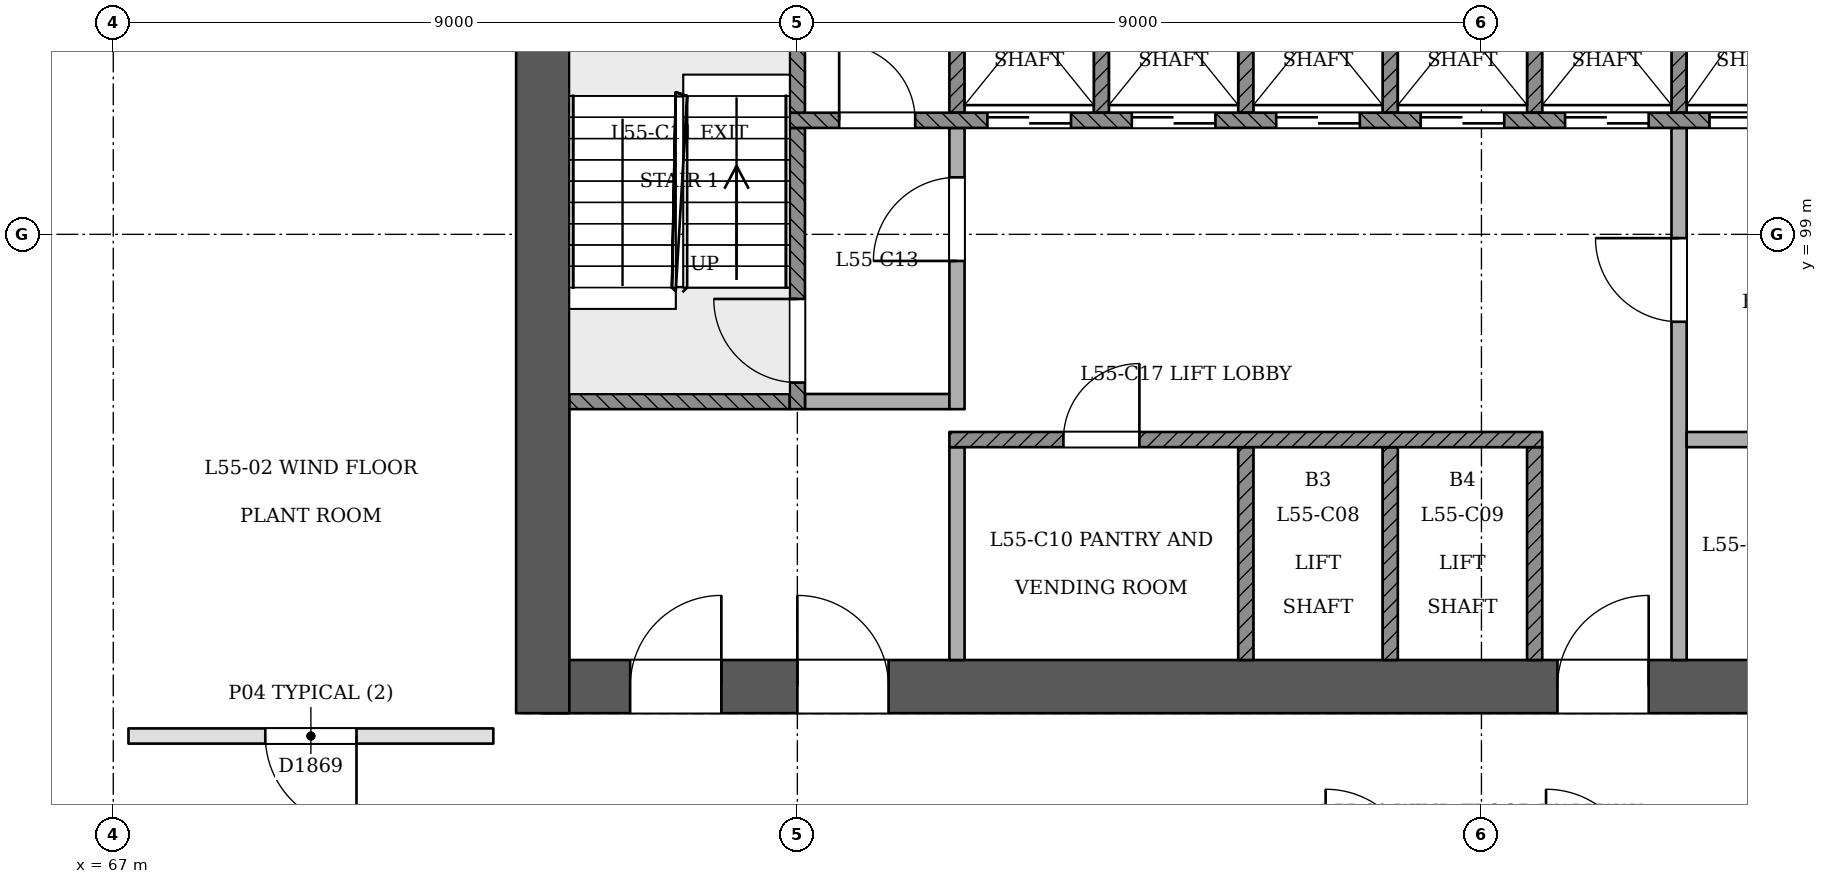
"""IFC4 building model, lengths in metres.
Left out: names, types, materials, properties, quantities, classifications, styles, units other than length and angle.
Written with IfcOpenShell. Run it as: python <this file> out.ifc"""

import sys

from ifc_helpers import new_model, si_unit, direction, frame, frame_2d, origin, place, context, subcontext, project, spatial, rectangle, extrude, element, fill, save


model = new_model("IFC4")
c1 = context("Model", 3, precision=1e-05, world=origin(), true_north=direction((0.0, 1.0)))
c2 = subcontext(c1, "Body", "Model", "MODEL_VIEW")
j1 = project(units=[si_unit("LENGTHUNIT", "METRE"), si_unit("PLANEANGLEUNIT", "RADIAN")], contexts=[c1])
p1 = place(None, origin())
s1 = spatial("IfcSite", under=j1, at=p1, CompositionType="ELEMENT")
p2 = place(p1, origin())
s2 = spatial("IfcBuilding", under=s1, at=p2, CompositionType="ELEMENT")
p3 = place(p2, frame((0.0, 0.0, 212.4)))
s3 = spatial("IfcBuildingStorey", under=s2, at=p3, CompositionType="ELEMENT", Elevation=212.4)
p4 = place(p3, frame((72.65, 93.05, 0.0), z_axis=(0.0, 0.0, 1.0), x_axis=(1.0, 0.0, 0.0)))
e1 = element("IfcWall", 1, at=p4, inside=s3, PredefinedType="SHEAR", context=c2, shape_type="SweptSolid", body=[
    extrude(rectangle(XDim=25.05, YDim=0.7, at=frame_2d((12.525, 0.0))), origin(), (0.0, 0.0, 1.0), 7.0),
])
p5 = place(p4, frame((1.15, 0.0, 0.0)))
e2 = element("IfcOpeningElement", 2, at=p5, cuts=e1, PredefinedType="OPENING", context=c2, shape_type="SweptSolid", body=[
    extrude(rectangle(XDim=1.2, YDim=2.1, at=frame_2d((0.6, 1.05))), frame((0.0, 0.36, 0.0), z_axis=(0.0, -1.0, 0.0), x_axis=(1.0, 0.0, 0.0)), (0.0, 0.0, 1.0), 0.721),
])
p6 = place(p4, frame((3.35, 0.0, 0.0)))
e3 = element("IfcOpeningElement", 3, at=p6, cuts=e1, PredefinedType="OPENING", context=c2, shape_type="SweptSolid", body=[
    extrude(rectangle(XDim=1.2, YDim=2.1, at=frame_2d((0.6, 1.05))), frame((0.0, 0.36, 0.0), z_axis=(0.0, -1.0, 0.0), x_axis=(1.0, 0.0, 0.0)), (0.0, 0.0, 1.0), 0.721),
])
p7 = place(p4, frame((13.35, 0.0, 0.0)))
e4 = element("IfcOpeningElement", 4, at=p7, cuts=e1, PredefinedType="OPENING", context=c2, shape_type="SweptSolid", body=[
    extrude(rectangle(XDim=1.2, YDim=2.1, at=frame_2d((0.6, 1.05))), frame((0.0, 0.36, 0.0), z_axis=(0.0, -1.0, 0.0), x_axis=(1.0, 0.0, 0.0)), (0.0, 0.0, 1.0), 0.721),
])
p8 = place(p4, frame((16.212, 0.0, 0.0)))
e5 = element("IfcOpeningElement", 5, at=p8, cuts=e1, PredefinedType="OPENING", context=c2, shape_type="SweptSolid", body=[
    extrude(rectangle(XDim=1.0, YDim=2.1, at=frame_2d((0.5, 1.05))), frame((0.0, 0.36, 0.0), z_axis=(0.0, -1.0, 0.0), x_axis=(1.0, 0.0, 0.0)), (0.0, 0.0, 1.0), 0.721),
])
p9 = place(p4, frame((19.65, 0.0, 0.0)))
e6 = element("IfcOpeningElement", 6, at=p9, cuts=e1, PredefinedType="OPENING", context=c2, shape_type="SweptSolid", body=[
    extrude(rectangle(XDim=1.0, YDim=2.1, at=frame_2d((0.5, 1.05))), frame((0.0, 0.36, 0.0), z_axis=(0.0, -1.0, 0.0), x_axis=(1.0, 0.0, 0.0)), (0.0, 0.0, 1.0), 0.721),
])
p10 = place(p4, frame((22.637, 0.0, 0.0)))
e7 = element("IfcOpeningElement", 7, at=p10, cuts=e1, PredefinedType="OPENING", context=c2, shape_type="SweptSolid", body=[
    extrude(rectangle(XDim=1.0, YDim=2.1, at=frame_2d((0.5, 1.05))), frame((0.0, 0.36, 0.0), z_axis=(0.0, -1.0, 0.0), x_axis=(1.0, 0.0, 0.0)), (0.0, 0.0, 1.0), 0.721),
])
p11 = place(p3, frame((72.65, 103.75, 0.0), z_axis=(0.0, 0.0, 1.0), x_axis=(0.0, -1.0, 0.0)))
e8 = element("IfcWall", 8, at=p11, inside=s3, PredefinedType="SHEAR", context=c2, shape_type="SweptSolid", body=[
    extrude(rectangle(XDim=11.05, YDim=0.7, at=frame_2d((5.525, 0.0))), origin(), (0.0, 0.0, 1.0), 7.0),
])
p12 = place(p3, frame((72.0, 92.4, 0.0), z_axis=(0.0, 0.0, 1.0), x_axis=(-1.0, 0.0, 0.0)))
e9 = element("IfcWall", 9, at=p12, inside=s3, PredefinedType="PARTITIONING", context=c2, shape_type="SweptSolid", body=[
    extrude(rectangle(XDim=4.8, YDim=0.2, at=frame_2d((2.4, 0.0))), origin(), (0.0, 0.0, 1.0), 6.6),
])
p13 = place(p12, frame((1.8, 0.0, 0.0)))
e10 = element("IfcOpeningElement", 10, at=p13, cuts=e9, PredefinedType="OPENING", context=c2, shape_type="SweptSolid", body=[
    extrude(rectangle(XDim=1.2, YDim=2.4, at=frame_2d((0.6, 1.2))), frame((0.0, 0.11, 0.0), z_axis=(0.0, -1.0, 0.0), x_axis=(1.0, 0.0, 0.0)), (0.0, 0.0, 1.0), 0.221),
])
p14 = place(p3, frame((78.1, 93.4, 0.0), z_axis=(0.0, 0.0, 1.0), x_axis=(0.0, 1.0, 0.0)))
e11 = element("IfcWall", 11, at=p14, inside=s3, PredefinedType="PARTITIONING", context=c2, shape_type="SweptSolid", body=[
    extrude(rectangle(XDim=2.8, YDim=0.2, at=frame_2d((1.4, 0.0))), origin(), (0.0, 0.0, 1.0), 6.6),
])
for number, where, z_axis, x_axis in (
    (12, (81.9, 93.4, 0.0), (0.0, 0.0, 1.0), (0.0, 1.0, 0.0)),
    (13, (83.8, 93.4, 0.0), (0.0, 0.0, 1.0), (0.0, 1.0, 0.0)),
    (14, (85.7, 93.4, 0.0), (0.0, 0.0, 1.0), (0.0, 1.0, 0.0)),
):
    element("IfcWall", number, at=place(p3, frame(where, z_axis=z_axis, x_axis=x_axis)), inside=s3, PredefinedType="SOLIDWALL", context=c2, shape_type="SweptSolid", body=[
        extrude(rectangle(XDim=2.8, YDim=0.2, at=frame_2d((1.4, 0.0))), origin(), (0.0, 0.0, 1.0), 6.6),
    ])
p15 = place(p3, frame((87.6, 93.4, 0.0), z_axis=(0.0, 0.0, 1.0), x_axis=(0.0, 1.0, 0.0)))
e15 = element("IfcWall", 15, at=p15, inside=s3, PredefinedType="PARTITIONING", context=c2, shape_type="SweptSolid", body=[
    extrude(rectangle(XDim=7.0, YDim=0.2, at=frame_2d((3.5, 0.0))), origin(), (0.0, 0.0, 1.0), 6.6),
])
p16 = place(p15, frame((4.45, 0.0, 0.0)))
e16 = element("IfcOpeningElement", 16, at=p16, cuts=e15, PredefinedType="OPENING", context=c2, shape_type="SweptSolid", body=[
    extrude(rectangle(XDim=1.1, YDim=2.1, at=frame_2d((0.55, 1.05))), frame((0.0, 0.11, 0.0), z_axis=(0.0, -1.0, 0.0), x_axis=(1.0, 0.0, 0.0)), (0.0, 0.0, 1.0), 0.221),
])
p17 = place(p3, frame((78.0, 96.3, 0.0), z_axis=(0.0, 0.0, 1.0), x_axis=(1.0, 0.0, 0.0)))
e17 = element("IfcWall", 17, at=p17, inside=s3, PredefinedType="SOLIDWALL", context=c2, shape_type="SweptSolid", body=[
    extrude(rectangle(XDim=7.8, YDim=0.2, at=frame_2d((3.9, 0.0))), origin(), (0.0, 0.0, 1.0), 6.6),
])
p18 = place(p17, frame((1.5, 0.0, 0.0)))
e18 = element("IfcOpeningElement", 18, at=p18, cuts=e17, PredefinedType="OPENING", context=c2, shape_type="SweptSolid", body=[
    extrude(rectangle(XDim=1.0, YDim=2.1, at=frame_2d((0.5, 1.05))), frame((0.0, 0.11, 0.0), z_axis=(0.0, -1.0, 0.0), x_axis=(1.0, 0.0, 0.0)), (0.0, 0.0, 1.0), 0.221),
])
p19 = place(p3, frame((87.7, 96.3, 0.0), z_axis=(0.0, 0.0, 1.0), x_axis=(1.0, 0.0, 0.0)))
e19 = element("IfcWall", 19, at=p19, inside=s3, PredefinedType="PARTITIONING", context=c2, shape_type="SweptSolid", body=[
    extrude(rectangle(XDim=3.6, YDim=0.2, at=frame_2d((1.8, 0.0))), origin(), (0.0, 0.0, 1.0), 6.6),
])
p20 = place(p3, frame((73.0, 96.8, 0.0), z_axis=(0.0, 0.0, 1.0), x_axis=(1.0, 0.0, 0.0)))
e20 = element("IfcWall", 20, at=p20, inside=s3, PredefinedType="SOLIDWALL", context=c2, shape_type="SweptSolid", body=[
    extrude(rectangle(XDim=2.9, YDim=0.2, at=frame_2d((1.45, 0.0))), origin(), (0.0, 0.0, 1.0), 6.6),
])
p21 = place(p3, frame((76.0, 96.7, 0.0), z_axis=(0.0, 0.0, 1.0), x_axis=(0.0, 1.0, 0.0)))
e21 = element("IfcWall", 21, at=p21, inside=s3, PredefinedType="SOLIDWALL", context=c2, shape_type="SweptSolid", body=[
    extrude(rectangle(XDim=3.7, YDim=0.2, at=frame_2d((1.85, 0.0))), origin(), (0.0, 0.0, 1.0), 6.6),
])
p22 = place(p21, frame((0.35, 0.0, 0.0)))
e22 = element("IfcOpeningElement", 22, at=p22, cuts=e21, PredefinedType="OPENING", context=c2, shape_type="SweptSolid", body=[
    extrude(rectangle(XDim=1.1, YDim=2.1, at=frame_2d((0.55, 1.05))), frame((0.0, 0.11, 0.0), z_axis=(0.0, -1.0, 0.0), x_axis=(1.0, 0.0, 0.0)), (0.0, 0.0, 1.0), 0.221),
])
p23 = place(p3, frame((76.1, 96.8, 0.0), z_axis=(0.0, 0.0, 1.0), x_axis=(1.0, 0.0, 0.0)))
e23 = element("IfcWall", 23, at=p23, inside=s3, PredefinedType="PARTITIONING", context=c2, shape_type="SweptSolid", body=[
    extrude(rectangle(XDim=1.9, YDim=0.2, at=frame_2d((0.95, 0.0))), origin(), (0.0, 0.0, 1.0), 6.6),
])
p24 = place(p3, frame((78.1, 96.7, 0.0), z_axis=(0.0, 0.0, 1.0), x_axis=(0.0, 1.0, 0.0)))
e24 = element("IfcWall", 24, at=p24, inside=s3, PredefinedType="PARTITIONING", context=c2, shape_type="SweptSolid", body=[
    extrude(rectangle(XDim=3.7, YDim=0.2, at=frame_2d((1.85, 0.0))), origin(), (0.0, 0.0, 1.0), 6.6),
])
p25 = place(p24, frame((1.95, 0.0, 0.0)))
e25 = element("IfcOpeningElement", 25, at=p25, cuts=e24, PredefinedType="OPENING", context=c2, shape_type="SweptSolid", body=[
    extrude(rectangle(XDim=1.1, YDim=2.1, at=frame_2d((0.55, 1.05))), frame((0.0, 0.11, 0.0), z_axis=(0.0, -1.0, 0.0), x_axis=(1.0, 0.0, 0.0)), (0.0, 0.0, 1.0), 0.221),
])
p26 = place(p3, frame((75.9, 100.5, 0.0), z_axis=(0.0, 0.0, 1.0), x_axis=(1.0, 0.0, 0.0)))
e26 = element("IfcWall", 26, at=p26, inside=s3, PredefinedType="SOLIDWALL", context=c2, shape_type="SweptSolid", body=[
    extrude(rectangle(XDim=18.2, YDim=0.2, at=frame_2d((9.1, 0.0))), origin(), (0.0, 0.0, 1.0), 6.6),
])
p27 = place(p26, frame((2.6, 0.0, 0.0)))
e27 = element("IfcOpeningElement", 27, at=p27, cuts=e26, PredefinedType="OPENING", context=c2, shape_type="SweptSolid", body=[
    extrude(rectangle(XDim=1.1, YDim=2.1, at=frame_2d((0.55, 1.05))), frame((0.0, 0.11, 0.0), z_axis=(0.0, -1.0, 0.0), x_axis=(1.0, 0.0, 0.0)), (0.0, 0.0, 1.0), 0.221),
])
p28 = place(p26, frame((4.5, 0.0, 0.0)))
e28 = element("IfcOpeningElement", 28, at=p28, cuts=e26, PredefinedType="OPENING", context=c2, shape_type="SweptSolid", body=[
    extrude(rectangle(XDim=1.1, YDim=2.1, at=frame_2d((0.55, 1.05))), frame((0.0, 0.11, 0.0), z_axis=(0.0, -1.0, 0.0), x_axis=(1.0, 0.0, 0.0)), (0.0, 0.0, 1.0), 0.221),
])
p29 = place(p26, frame((6.4, 0.0, 0.0)))
e29 = element("IfcOpeningElement", 29, at=p29, cuts=e26, PredefinedType="OPENING", context=c2, shape_type="SweptSolid", body=[
    extrude(rectangle(XDim=1.1, YDim=2.1, at=frame_2d((0.55, 1.05))), frame((0.0, 0.11, 0.0), z_axis=(0.0, -1.0, 0.0), x_axis=(1.0, 0.0, 0.0)), (0.0, 0.0, 1.0), 0.221),
])
p30 = place(p26, frame((8.3, 0.0, 0.0)))
e30 = element("IfcOpeningElement", 30, at=p30, cuts=e26, PredefinedType="OPENING", context=c2, shape_type="SweptSolid", body=[
    extrude(rectangle(XDim=1.1, YDim=2.1, at=frame_2d((0.55, 1.05))), frame((0.0, 0.11, 0.0), z_axis=(0.0, -1.0, 0.0), x_axis=(1.0, 0.0, 0.0)), (0.0, 0.0, 1.0), 0.221),
])
p31 = place(p26, frame((10.2, 0.0, 0.0)))
e31 = element("IfcOpeningElement", 31, at=p31, cuts=e26, PredefinedType="OPENING", context=c2, shape_type="SweptSolid", body=[
    extrude(rectangle(XDim=1.1, YDim=2.1, at=frame_2d((0.55, 1.05))), frame((0.0, 0.11, 0.0), z_axis=(0.0, -1.0, 0.0), x_axis=(1.0, 0.0, 0.0)), (0.0, 0.0, 1.0), 0.221),
])
p32 = place(p26, frame((12.1, 0.0, 0.0)))
e32 = element("IfcOpeningElement", 32, at=p32, cuts=e26, PredefinedType="OPENING", context=c2, shape_type="SweptSolid", body=[
    extrude(rectangle(XDim=1.1, YDim=2.1, at=frame_2d((0.55, 1.05))), frame((0.0, 0.11, 0.0), z_axis=(0.0, -1.0, 0.0), x_axis=(1.0, 0.0, 0.0)), (0.0, 0.0, 1.0), 0.221),
])
p33 = place(p26, frame((14.0, 0.0, 0.0)))
e33 = element("IfcOpeningElement", 33, at=p33, cuts=e26, PredefinedType="OPENING", context=c2, shape_type="SweptSolid", body=[
    extrude(rectangle(XDim=1.1, YDim=2.1, at=frame_2d((0.55, 1.05))), frame((0.0, 0.11, 0.0), z_axis=(0.0, -1.0, 0.0), x_axis=(1.0, 0.0, 0.0)), (0.0, 0.0, 1.0), 0.221),
])
p34 = place(p26, frame((0.65, 0.0, 0.0)))
e34 = element("IfcOpeningElement", 34, at=p34, cuts=e26, PredefinedType="OPENING", context=c2, shape_type="SweptSolid", body=[
    extrude(rectangle(XDim=1.0, YDim=2.1, at=frame_2d((0.5, 1.05))), frame((0.0, 0.11, 0.0), z_axis=(0.0, -1.0, 0.0), x_axis=(1.0, 0.0, 0.0)), (0.0, 0.0, 1.0), 0.221),
])
p35 = place(p26, frame((16.3, 0.0, 0.0)))
e35 = element("IfcOpeningElement", 35, at=p35, cuts=e26, PredefinedType="OPENING", context=c2, shape_type="SweptSolid", body=[
    extrude(rectangle(XDim=1.0, YDim=2.1, at=frame_2d((0.5, 1.05))), frame((0.0, 0.11, 0.0), z_axis=(0.0, -1.0, 0.0), x_axis=(1.0, 0.0, 0.0)), (0.0, 0.0, 1.0), 0.221),
])
for number, where, z_axis, x_axis in (
    (36, (76.0, 100.6, 0.0), (0.0, 0.0, 1.0), (0.0, 1.0, 0.0)),
    (37, (78.1, 100.6, 0.0), (0.0, 0.0, 1.0), (0.0, 1.0, 0.0)),
    (38, (80.0, 100.6, 0.0), (0.0, 0.0, 1.0), (0.0, 1.0, 0.0)),
    (39, (81.9, 100.6, 0.0), (0.0, 0.0, 1.0), (0.0, 1.0, 0.0)),
    (40, (83.8, 100.6, 0.0), (0.0, 0.0, 1.0), (0.0, 1.0, 0.0)),
    (41, (85.7, 100.6, 0.0), (0.0, 0.0, 1.0), (0.0, 1.0, 0.0)),
    (42, (87.6, 100.6, 0.0), (0.0, 0.0, 1.0), (0.0, 1.0, 0.0)),
):
    element("IfcWall", number, at=place(p3, frame(where, z_axis=z_axis, x_axis=x_axis)), inside=s3, PredefinedType="SOLIDWALL", context=c2, shape_type="SweptSolid", body=[
        extrude(rectangle(XDim=2.8, YDim=0.2, at=frame_2d((1.4, 0.0))), origin(), (0.0, 0.0, 1.0), 6.6),
    ])
p36 = place(p13, origin())
e43 = element("IfcDoor", 43, at=p36, inside=s3, OperationType="SINGLE_SWING_LEFT", PredefinedType="NOTDEFINED", context=c2, shape_type="SweptSolid", body=[
    extrude(rectangle(XDim=1.2, YDim=2.4, at=frame_2d((0.6, 1.2))), frame((0.0, 0.025, 0.0), z_axis=(0.0, -1.0, 0.0), x_axis=(1.0, 0.0, 0.0)), (0.0, 0.0, 1.0), 0.05),
])
fill(e10, e43)
p37 = place(p27, origin())
e44 = element("IfcDoor", 44, at=p37, inside=s3, OperationType="SLIDING_TO_RIGHT", PredefinedType="NOTDEFINED", context=c2, shape_type="SweptSolid", body=[
    extrude(rectangle(XDim=1.1, YDim=2.1, at=frame_2d((0.55, 1.05))), frame((0.0, 0.025, 0.0), z_axis=(0.0, -1.0, 0.0), x_axis=(1.0, 0.0, 0.0)), (0.0, 0.0, 1.0), 0.05),
])
fill(e27, e44)
p38 = place(p28, origin())
e45 = element("IfcDoor", 45, at=p38, inside=s3, OperationType="SLIDING_TO_LEFT", PredefinedType="NOTDEFINED", context=c2, shape_type="SweptSolid", body=[
    extrude(rectangle(XDim=1.1, YDim=2.1, at=frame_2d((0.55, 1.05))), frame((0.0, 0.025, 0.0), z_axis=(0.0, -1.0, 0.0), x_axis=(1.0, 0.0, 0.0)), (0.0, 0.0, 1.0), 0.05),
])
fill(e28, e45)
p39 = place(p29, origin())
e46 = element("IfcDoor", 46, at=p39, inside=s3, OperationType="SLIDING_TO_RIGHT", PredefinedType="NOTDEFINED", context=c2, shape_type="SweptSolid", body=[
    extrude(rectangle(XDim=1.1, YDim=2.1, at=frame_2d((0.55, 1.05))), frame((0.0, 0.025, 0.0), z_axis=(0.0, -1.0, 0.0), x_axis=(1.0, 0.0, 0.0)), (0.0, 0.0, 1.0), 0.05),
])
fill(e29, e46)
p40 = place(p30, origin())
e47 = element("IfcDoor", 47, at=p40, inside=s3, OperationType="SLIDING_TO_LEFT", PredefinedType="NOTDEFINED", context=c2, shape_type="SweptSolid", body=[
    extrude(rectangle(XDim=1.1, YDim=2.1, at=frame_2d((0.55, 1.05))), frame((0.0, 0.025, 0.0), z_axis=(0.0, -1.0, 0.0), x_axis=(1.0, 0.0, 0.0)), (0.0, 0.0, 1.0), 0.05),
])
fill(e30, e47)
p41 = place(p31, origin())
e48 = element("IfcDoor", 48, at=p41, inside=s3, OperationType="SLIDING_TO_RIGHT", PredefinedType="NOTDEFINED", context=c2, shape_type="SweptSolid", body=[
    extrude(rectangle(XDim=1.1, YDim=2.1, at=frame_2d((0.55, 1.05))), frame((0.0, 0.025, 0.0), z_axis=(0.0, -1.0, 0.0), x_axis=(1.0, 0.0, 0.0)), (0.0, 0.0, 1.0), 0.05),
])
fill(e31, e48)
p42 = place(p32, origin())
e49 = element("IfcDoor", 49, at=p42, inside=s3, OperationType="SLIDING_TO_RIGHT", PredefinedType="NOTDEFINED", context=c2, shape_type="SweptSolid", body=[
    extrude(rectangle(XDim=1.1, YDim=2.1, at=frame_2d((0.55, 1.05))), frame((0.0, 0.025, 0.0), z_axis=(0.0, -1.0, 0.0), x_axis=(1.0, 0.0, 0.0)), (0.0, 0.0, 1.0), 0.05),
])
fill(e32, e49)
p43 = place(p22, origin())
e50 = element("IfcDoor", 50, at=p43, inside=s3, OperationType="SINGLE_SWING_RIGHT", PredefinedType="NOTDEFINED", context=c2, shape_type="SweptSolid", body=[
    extrude(rectangle(XDim=1.1, YDim=2.1, at=frame_2d((0.55, 1.05))), frame((0.0, 0.025, 0.0), z_axis=(0.0, -1.0, 0.0), x_axis=(1.0, 0.0, 0.0)), (0.0, 0.0, 1.0), 0.05),
])
fill(e22, e50)
p44 = place(p25, origin())
e51 = element("IfcDoor", 51, at=p44, inside=s3, OperationType="SINGLE_SWING_LEFT", PredefinedType="NOTDEFINED", context=c2, shape_type="SweptSolid", body=[
    extrude(rectangle(XDim=1.1, YDim=2.1, at=frame_2d((0.55, 1.05))), frame((0.0, 0.025, 0.0), z_axis=(0.0, -1.0, 0.0), x_axis=(1.0, 0.0, 0.0)), (0.0, 0.0, 1.0), 0.05),
])
fill(e25, e51)
p45 = place(p16, origin())
e52 = element("IfcDoor", 52, at=p45, inside=s3, OperationType="SINGLE_SWING_RIGHT", PredefinedType="NOTDEFINED", context=c2, shape_type="SweptSolid", body=[
    extrude(rectangle(XDim=1.1, YDim=2.1, at=frame_2d((0.55, 1.05))), frame((0.0, 0.025, 0.0), z_axis=(0.0, -1.0, 0.0), x_axis=(1.0, 0.0, 0.0)), (0.0, 0.0, 1.0), 0.05),
])
fill(e16, e52)
p46 = place(p5, origin())
e53 = element("IfcDoor", 53, at=p46, inside=s3, OperationType="SINGLE_SWING_RIGHT", PredefinedType="NOTDEFINED", context=c2, shape_type="SweptSolid", body=[
    extrude(rectangle(XDim=1.2, YDim=2.1, at=frame_2d((0.6, 1.05))), frame((0.0, 0.025, 0.0), z_axis=(0.0, -1.0, 0.0), x_axis=(1.0, 0.0, 0.0)), (0.0, 0.0, 1.0), 0.05),
])
fill(e2, e53)
p47 = place(p6, origin())
e54 = element("IfcDoor", 54, at=p47, inside=s3, OperationType="SINGLE_SWING_LEFT", PredefinedType="NOTDEFINED", context=c2, shape_type="SweptSolid", body=[
    extrude(rectangle(XDim=1.2, YDim=2.1, at=frame_2d((0.6, 1.05))), frame((0.0, 0.025, 0.0), z_axis=(0.0, -1.0, 0.0), x_axis=(1.0, 0.0, 0.0)), (0.0, 0.0, 1.0), 0.05),
])
fill(e3, e54)
p48 = place(p7, origin())
e55 = element("IfcDoor", 55, at=p48, inside=s3, OperationType="SINGLE_SWING_RIGHT", PredefinedType="NOTDEFINED", context=c2, shape_type="SweptSolid", body=[
    extrude(rectangle(XDim=1.2, YDim=2.1, at=frame_2d((0.6, 1.05))), frame((0.0, 0.025, 0.0), z_axis=(0.0, -1.0, 0.0), x_axis=(1.0, 0.0, 0.0)), (0.0, 0.0, 1.0), 0.05),
])
fill(e4, e55)
p49 = place(p34, origin())
e56 = element("IfcDoor", 56, at=p49, inside=s3, OperationType="SINGLE_SWING_LEFT", PredefinedType="NOTDEFINED", context=c2, shape_type="SweptSolid", body=[
    extrude(rectangle(XDim=1.0, YDim=2.1, at=frame_2d((0.5, 1.05))), frame((0.0, 0.025, 0.0), z_axis=(0.0, -1.0, 0.0), x_axis=(1.0, 0.0, 0.0)), (0.0, 0.0, 1.0), 0.05),
])
fill(e34, e56)
p50 = place(p18, origin())
e57 = element("IfcDoor", 57, at=p50, inside=s3, OperationType="SINGLE_SWING_RIGHT", PredefinedType="NOTDEFINED", context=c2, shape_type="SweptSolid", body=[
    extrude(rectangle(XDim=1.0, YDim=2.1, at=frame_2d((0.5, 1.05))), frame((0.0, 0.025, 0.0), z_axis=(0.0, -1.0, 0.0), x_axis=(1.0, 0.0, 0.0)), (0.0, 0.0, 1.0), 0.05),
])
fill(e18, e57)
save(model, sys.argv[1])
